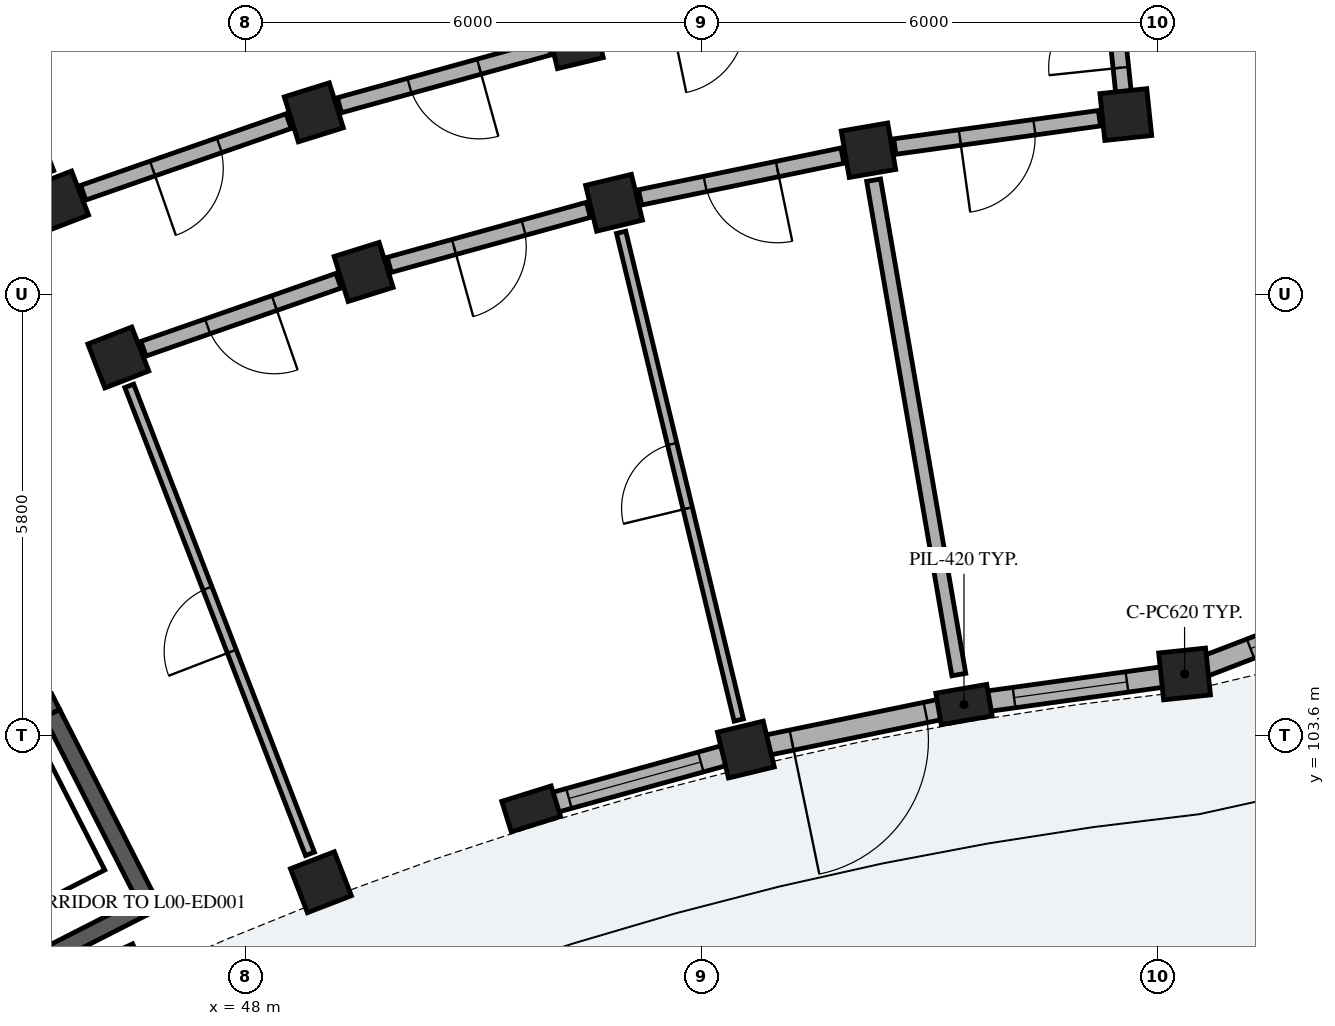
"""IFC4 building model, lengths in metres.
Left out: names, types, materials, properties, quantities, classifications, styles, units other than length and angle.
Written with IfcOpenShell. Run it as: python <this file> out.ifc"""

import sys

from ifc_helpers import new_model, si_unit, direction, frame, frame_2d, origin, origin_2d, place, context, subcontext, project, spatial, rectangle, extrude, element, fill, save


model = new_model("IFC4")
c1 = context("Model", 3, precision=1e-05, world=origin(), true_north=direction((0.0, 1.0)))
c2 = subcontext(c1, "Body", "Model", "MODEL_VIEW")
j1 = project(units=[si_unit("LENGTHUNIT", "METRE"), si_unit("PLANEANGLEUNIT", "RADIAN")], contexts=[c1])
p1 = place(None, origin())
s1 = spatial("IfcSite", under=j1, at=p1, CompositionType="ELEMENT")
p2 = place(p1, origin())
s2 = spatial("IfcBuilding", under=s1, at=p2, CompositionType="ELEMENT")
p3 = place(p2, origin())
s3 = spatial("IfcBuildingStorey", under=s2, at=p3, CompositionType="ELEMENT", Elevation=0.0)
p4 = place(p3, frame((42.597, 102.561, 0.0), z_axis=(0.0, 0.0, 1.0), x_axis=(0.891001200497, 0.454000947921, 0.0)))
e1 = element("IfcWall", 1, at=p4, inside=s3, PredefinedType="SHEAR", context=c2, shape_type="SweptSolid", body=[
    extrude(rectangle(XDim=3.26, YDim=0.23, at=frame_2d((1.63, 0.0))), origin(), (0.0, 0.0, 1.0), 4.48),
])
p5 = place(p4, frame((0.9, 0.0, 0.0)))
e2 = element("IfcOpeningElement", 2, at=p5, cuts=e1, PredefinedType="OPENING", context=c2, shape_type="SweptSolid", body=[
    extrude(rectangle(XDim=1.1, YDim=2.15, at=frame_2d((0.55, 1.075))), frame((0.0, 0.125, 0.0), z_axis=(0.0, -1.0, 0.0), x_axis=(1.0, 0.0, 0.0)), (0.0, 0.0, 1.0), 0.25),
])
p6 = place(p3, frame((43.927, 99.95, 0.0), z_axis=(0.0, 0.0, 1.0), x_axis=(0.891016635648, 0.453970654337, 0.0)))
e3 = element("IfcWall", 3, at=p6, inside=s3, PredefinedType="SHEAR", context=c2, shape_type="SweptSolid", body=[
    extrude(rectangle(XDim=3.26, YDim=0.23, at=frame_2d((1.63, 0.0))), origin(), (0.0, 0.0, 1.0), 4.48),
])
p7 = place(p3, frame((45.451, 103.886, 0.0), z_axis=(0.0, 0.0, 1.0), x_axis=(0.454000278178, -0.891001541758, 0.0)))
e4 = element("IfcWall", 4, at=p7, inside=s3, PredefinedType="SHEAR", context=c2, shape_type="SweptSolid", body=[
    extrude(rectangle(XDim=2.7, YDim=0.23, at=frame_2d((1.35, 0.0))), origin(), (0.0, 0.0, 1.0), 4.48),
])
for number, where, z_axis, x_axis in (
    (5, (60.354, 104.406, 0.0), (0.0, 0.0, 1.0), (-0.105, 0.995, 0.0)),
    (6, (59.58, 111.766, 0.0), (0.0, 0.0, 1.0), (-0.105, 0.995, 0.0)),
):
    element("IfcColumn", number, at=place(p3, frame(where, z_axis=z_axis, x_axis=x_axis)), inside=s3, PredefinedType="COLUMN", context=c2, shape_type="SweptSolid", body=[
        extrude(rectangle(XDim=0.62, YDim=0.62, at=origin_2d()), origin(), (0.0, 0.0, 1.0), 4.485),
    ])
p8 = place(p3, frame((57.451, 104.004, 0.0), z_axis=(0.0, 0.0, 1.0), x_axis=(-0.169827298811, 0.985473839622, 0.0)))
e7 = element("IfcColumn", 7, at=p8, inside=s3, PredefinedType="PILASTER", context=c2, shape_type="SweptSolid", body=[
    extrude(rectangle(XDim=0.42, YDim=0.68, at=origin_2d()), origin(), (0.0, 0.0, 1.0), 4.485),
])
for number, where, z_axis, x_axis in (
    (8, (56.194, 111.297, 0.0), (0.0, 0.0, 1.0), (-0.17, 0.985, 0.0)),
    (9, (54.582, 103.412, 0.0), (0.0, 0.0, 1.0), (-0.234, 0.972, 0.0)),
    (10, (52.847, 110.606, 0.0), (0.0, 0.0, 1.0), (-0.234, 0.972, 0.0)),
    (11, (52.331, 112.744, 0.0), (0.0, 0.0, 1.0), (-0.234, 0.972, 0.0)),
):
    element("IfcColumn", number, at=place(p3, frame(where, z_axis=z_axis, x_axis=x_axis)), inside=s3, PredefinedType="COLUMN", context=c2, shape_type="SweptSolid", body=[
        extrude(rectangle(XDim=0.62, YDim=0.62, at=origin_2d()), origin(), (0.0, 0.0, 1.0), 4.485),
    ])
p9 = place(p3, frame((51.757, 102.631, 0.0), z_axis=(0.0, 0.0, 1.0), x_axis=(-0.297930292146, 0.954587628781, 0.0)))
e12 = element("IfcColumn", 12, at=p9, inside=s3, PredefinedType="PILASTER", context=c2, shape_type="SweptSolid", body=[
    extrude(rectangle(XDim=0.42, YDim=0.68, at=origin_2d()), origin(), (0.0, 0.0, 1.0), 4.485),
])
for number, where, z_axis, x_axis in (
    (13, (49.552, 109.695, 0.0), (0.0, 0.0, 1.0), (-0.298, 0.955, 0.0)),
    (14, (48.897, 111.795, 0.0), (0.0, 0.0, 1.0), (-0.298, 0.955, 0.0)),
    (15, (48.99, 101.667, 0.0), (0.0, 0.0, 1.0), (-0.36, 0.933, 0.0)),
    (16, (46.325, 108.57, 0.0), (0.0, 0.0, 1.0), (-0.36, 0.933, 0.0)),
    (17, (45.532, 110.622, 0.0), (0.0, 0.0, 1.0), (-0.36, 0.933, 0.0)),
):
    element("IfcColumn", number, at=place(p3, frame(where, z_axis=z_axis, x_axis=x_axis)), inside=s3, PredefinedType="COLUMN", context=c2, shape_type="SweptSolid", body=[
        extrude(rectangle(XDim=0.62, YDim=0.62, at=origin_2d()), origin(), (0.0, 0.0, 1.0), 4.485),
    ])
p10 = place(p3, frame((46.293, 100.522, 0.0), z_axis=(0.0, 0.0, 1.0), x_axis=(-0.420859924104, 0.907125638643, 0.0)))
e18 = element("IfcColumn", 18, at=p10, inside=s3, PredefinedType="PILASTER", context=c2, shape_type="SweptSolid", body=[
    extrude(rectangle(XDim=0.42, YDim=0.68, at=origin_2d()), origin(), (0.0, 0.0, 1.0), 4.485),
])
p11 = place(p3, frame((60.076, 104.368, 0.0), z_axis=(0.0, 0.0, 1.0), x_axis=(-0.990533748482, -0.137269418003, 0.0)))
e19 = element("IfcWall", 19, at=p11, inside=s3, PredefinedType="SOLIDWALL", context=c2, shape_type="SweptSolid", body=[
    extrude(rectangle(XDim=2.47, YDim=0.27, at=frame_2d((1.235, 0.0))), origin(), (0.0, 0.0, 1.0), 3.755),
])
p12 = place(p11, frame((0.485, 0.0, 0.55)))
e20 = element("IfcOpeningElement", 20, at=p12, cuts=e19, PredefinedType="OPENING", context=c2, shape_type="SweptSolid", body=[
    extrude(rectangle(XDim=1.5, YDim=1.7, at=frame_2d((0.75, 0.85))), frame((0.0, 0.145, 0.0), z_axis=(0.0, -1.0, 0.0), x_axis=(1.0, 0.0, 0.0)), (0.0, 0.0, 1.0), 0.29),
])
p13 = place(p3, frame((57.275, 103.968, 0.0), z_axis=(0.0, 0.0, 1.0), x_axis=(-0.9793219046, -0.202308198478, 0.0)))
e21 = element("IfcWall", 21, at=p13, inside=s3, PredefinedType="SOLIDWALL", context=c2, shape_type="SweptSolid", body=[
    extrude(rectangle(XDim=2.47, YDim=0.27, at=frame_2d((1.235, 0.0))), origin(), (0.0, 0.0, 1.0), 3.755),
])
p14 = place(p13, frame((0.335, 0.0, 0.0)))
e22 = element("IfcOpeningElement", 22, at=p14, cuts=e21, PredefinedType="OPENING", context=c2, shape_type="SweptSolid", body=[
    extrude(rectangle(XDim=1.8, YDim=2.15, at=frame_2d((0.9, 1.075))), frame((0.0, 0.145, 0.0), z_axis=(0.0, -1.0, 0.0), x_axis=(1.0, 0.0, 0.0)), (0.0, 0.0, 1.0), 0.29),
])
p15 = place(p3, frame((54.312, 103.337, 0.0), z_axis=(0.0, 0.0, 1.0), x_axis=(-0.963903451939, -0.266252014716, 0.0)))
e23 = element("IfcWall", 23, at=p15, inside=s3, PredefinedType="SOLIDWALL", context=c2, shape_type="SweptSolid", body=[
    extrude(rectangle(XDim=2.47, YDim=0.27, at=frame_2d((1.235, 0.0))), origin(), (0.0, 0.0, 1.0), 3.755),
])
p16 = place(p15, frame((0.335, 0.0, 0.55)))
e24 = element("IfcOpeningElement", 24, at=p16, cuts=e23, PredefinedType="OPENING", context=c2, shape_type="SweptSolid", body=[
    extrude(rectangle(XDim=1.8, YDim=1.85, at=frame_2d((0.9, 0.925))), frame((0.0, 0.145, 0.0), z_axis=(0.0, -1.0, 0.0), x_axis=(1.0, 0.0, 0.0)), (0.0, 0.0, 1.0), 0.29),
])
p17 = place(p3, frame((64.002, 105.807, 0.0), z_axis=(0.0, 0.0, 1.0), x_axis=(-0.93356922619, -0.35839712598, 0.0)))
e25 = element("IfcWall", 25, at=p17, inside=s3, PredefinedType="SOLIDWALL", context=c2, shape_type="SweptSolid", body=[
    extrude(rectangle(XDim=3.908, YDim=0.27, at=frame_2d((1.954, 0.0))), origin(), (0.0, 0.0, 1.0), 3.755),
])
p18 = place(p17, frame((0.929, 0.0, 0.4)))
e26 = element("IfcOpeningElement", 26, at=p18, cuts=e25, PredefinedType="OPENING", context=c2, shape_type="SweptSolid", body=[
    extrude(rectangle(XDim=2.05, YDim=1.82, at=frame_2d((1.025, 0.91))), frame((0.0, 0.145, 0.0), z_axis=(0.0, -1.0, 0.0), x_axis=(1.0, 0.0, 0.0)), (0.0, 0.0, 1.0), 0.29),
])
p19 = place(p3, frame((59.233, 111.718, 0.0), z_axis=(0.0, 0.0, 1.0), x_axis=(-0.990535404475, -0.137257467855, 0.0)))
e27 = element("IfcWall", 27, at=p19, inside=s3, PredefinedType="PARTITIONING", context=c2, shape_type="SweptSolid", body=[
    extrude(rectangle(XDim=2.718, YDim=0.205, at=frame_2d((1.359, 0.0))), origin(), (0.0, 0.0, 1.0), 3.1),
])
p20 = place(p19, frame((0.864, 0.0, 0.0)))
e28 = element("IfcOpeningElement", 28, at=p20, cuts=e27, PredefinedType="OPENING", context=c2, shape_type="SweptSolid", body=[
    extrude(rectangle(XDim=0.99, YDim=2.16, at=frame_2d((0.495, 1.08))), frame((0.0, 0.113, 0.0), z_axis=(0.0, -1.0, 0.0), x_axis=(1.0, 0.0, 0.0)), (0.0, 0.0, 1.0), 0.225),
])
p21 = place(p3, frame((57.383, 104.398, 0.0), z_axis=(0.0, 0.0, 1.0), x_axis=(-0.169825160084, 0.985474208187, 0.0)))
e29 = element("IfcWall", 29, at=p21, inside=s3, PredefinedType="PARTITIONING", context=c2, shape_type="SweptSolid", body=[
    extrude(rectangle(XDim=6.6, YDim=0.185, at=frame_2d((3.3, 0.0))), origin(), (0.0, 0.0, 1.0), 3.1),
])
p22 = place(p3, frame((55.852, 111.226, 0.0), z_axis=(0.0, 0.0, 1.0), x_axis=(-0.979349423541, -0.202174940608, 0.0)))
e30 = element("IfcWall", 30, at=p22, inside=s3, PredefinedType="PARTITIONING", context=c2, shape_type="SweptSolid", body=[
    extrude(rectangle(XDim=2.718, YDim=0.205, at=frame_2d((1.359, 0.0))), origin(), (0.0, 0.0, 1.0), 3.1),
])
p23 = place(p22, frame((0.874, 0.0, 0.0)))
e31 = element("IfcOpeningElement", 31, at=p23, cuts=e30, PredefinedType="OPENING", context=c2, shape_type="SweptSolid", body=[
    extrude(rectangle(XDim=0.97, YDim=2.15, at=frame_2d((0.485, 1.075))), frame((0.0, 0.113, 0.0), z_axis=(0.0, -1.0, 0.0), x_axis=(1.0, 0.0, 0.0)), (0.0, 0.0, 1.0), 0.225),
])
p24 = place(p3, frame((54.488, 103.801, 0.0), z_axis=(0.0, 0.0, 1.0), x_axis=(-0.234406698576, 0.972138621629, 0.0)))
e32 = element("IfcWall", 32, at=p24, inside=s3, PredefinedType="PARTITIONING", context=c2, shape_type="SweptSolid", body=[
    extrude(rectangle(XDim=6.6, YDim=0.125, at=frame_2d((3.3, 0.0))), origin(), (0.0, 0.0, 1.0), 3.1),
])
p25 = place(p24, frame((2.865, 0.0, 0.0)))
e33 = element("IfcOpeningElement", 33, at=p25, cuts=e32, PredefinedType="OPENING", context=c2, shape_type="SweptSolid", body=[
    extrude(rectangle(XDim=0.87, YDim=2.08, at=frame_2d((0.435, 1.04))), frame((0.0, 0.073, 0.0), z_axis=(0.0, -1.0, 0.0), x_axis=(1.0, 0.0, 0.0)), (0.0, 0.0, 1.0), 0.145),
])
p26 = place(p3, frame((51.994, 112.651, 0.0), z_axis=(0.0, 0.0, 1.0), x_axis=(-0.963890789093, -0.266297853356, 0.0)))
e34 = element("IfcWall", 34, at=p26, inside=s3, PredefinedType="PARTITIONING", context=c2, shape_type="SweptSolid", body=[
    extrude(rectangle(XDim=2.863, YDim=0.205, at=frame_2d((1.432, 0.0))), origin(), (0.0, 0.0, 1.0), 3.1),
])
p27 = place(p26, frame((0.957, 0.0, 0.0)))
e35 = element("IfcOpeningElement", 35, at=p27, cuts=e34, PredefinedType="OPENING", context=c2, shape_type="SweptSolid", body=[
    extrude(rectangle(XDim=0.95, YDim=2.13, at=frame_2d((0.475, 1.065))), frame((0.0, 0.113, 0.0), z_axis=(0.0, -1.0, 0.0), x_axis=(1.0, 0.0, 0.0)), (0.0, 0.0, 1.0), 0.225),
])
p28 = place(p3, frame((52.51, 110.512, 0.0), z_axis=(0.0, 0.0, 1.0), x_axis=(-0.96388375821, -0.266323301006, 0.0)))
e36 = element("IfcWall", 36, at=p28, inside=s3, PredefinedType="PARTITIONING", context=c2, shape_type="SweptSolid", body=[
    extrude(rectangle(XDim=2.718, YDim=0.205, at=frame_2d((1.359, 0.0))), origin(), (0.0, 0.0, 1.0), 3.1),
])
p29 = place(p28, frame((0.884, 0.0, 0.0)))
e37 = element("IfcOpeningElement", 37, at=p29, cuts=e36, PredefinedType="OPENING", context=c2, shape_type="SweptSolid", body=[
    extrude(rectangle(XDim=0.95, YDim=2.13, at=frame_2d((0.475, 1.065))), frame((0.0, 0.113, 0.0), z_axis=(0.0, -1.0, 0.0), x_axis=(1.0, 0.0, 0.0)), (0.0, 0.0, 1.0), 0.225),
])
p30 = place(p3, frame((48.566, 111.68, 0.0), z_axis=(0.0, 0.0, 1.0), x_axis=(-0.944253820929, -0.329218349522, 0.0)))
e38 = element("IfcWall", 38, at=p30, inside=s3, PredefinedType="PARTITIONING", context=c2, shape_type="SweptSolid", body=[
    extrude(rectangle(XDim=2.863, YDim=0.205, at=frame_2d((1.432, 0.0))), origin(), (0.0, 0.0, 1.0), 3.1),
])
p31 = place(p30, frame((0.967, 0.0, 0.0)))
e39 = element("IfcOpeningElement", 39, at=p31, cuts=e38, PredefinedType="OPENING", context=c2, shape_type="SweptSolid", body=[
    extrude(rectangle(XDim=0.93, YDim=2.12, at=frame_2d((0.465, 1.06))), frame((0.0, 0.113, 0.0), z_axis=(0.0, -1.0, 0.0), x_axis=(1.0, 0.0, 0.0)), (0.0, 0.0, 1.0), 0.225),
])
p32 = place(p3, frame((49.222, 109.58, 0.0), z_axis=(0.0, 0.0, 1.0), x_axis=(-0.944265123647, -0.329185929627, 0.0)))
e40 = element("IfcWall", 40, at=p32, inside=s3, PredefinedType="PARTITIONING", context=c2, shape_type="SweptSolid", body=[
    extrude(rectangle(XDim=2.718, YDim=0.205, at=frame_2d((1.359, 0.0))), origin(), (0.0, 0.0, 1.0), 3.1),
])
p33 = place(p32, frame((0.894, 0.0, 0.0)))
e41 = element("IfcOpeningElement", 41, at=p33, cuts=e40, PredefinedType="OPENING", context=c2, shape_type="SweptSolid", body=[
    extrude(rectangle(XDim=0.93, YDim=2.12, at=frame_2d((0.465, 1.06))), frame((0.0, 0.113, 0.0), z_axis=(0.0, -1.0, 0.0), x_axis=(1.0, 0.0, 0.0)), (0.0, 0.0, 1.0), 0.225),
])
p34 = place(p3, frame((45.388, 110.996, 0.0), z_axis=(0.0, 0.0, 1.0), x_axis=(-0.360186633854, 0.932880264982, 0.0)))
e42 = element("IfcWall", 42, at=p34, inside=s3, PredefinedType="PARTITIONING", context=c2, shape_type="SweptSolid", body=[
    extrude(rectangle(XDim=4.7, YDim=0.185, at=frame_2d((2.35, 0.0))), origin(), (0.0, 0.0, 1.0), 3.1),
])
p35 = place(p3, frame((48.846, 102.04, 0.0), z_axis=(0.0, 0.0, 1.0), x_axis=(-0.360183473608, 0.932881485152, 0.0)))
e43 = element("IfcWall", 43, at=p35, inside=s3, PredefinedType="PARTITIONING", context=c2, shape_type="SweptSolid", body=[
    extrude(rectangle(XDim=6.6, YDim=0.125, at=frame_2d((3.3, 0.0))), origin(), (0.0, 0.0, 1.0), 3.1),
])
p36 = place(p35, frame((2.855, 0.0, 0.0)))
e44 = element("IfcOpeningElement", 44, at=p36, cuts=e43, PredefinedType="OPENING", context=c2, shape_type="SweptSolid", body=[
    extrude(rectangle(XDim=0.89, YDim=2.1, at=frame_2d((0.445, 1.05))), frame((0.0, 0.073, 0.0), z_axis=(0.0, -1.0, 0.0), x_axis=(1.0, 0.0, 0.0)), (0.0, 0.0, 1.0), 0.145),
])
p37 = place(p3, frame((59.575, 111.816, 0.0), z_axis=(0.0, 0.0, 1.0), x_axis=(-0.104509292252, 0.994523910136, 0.0)))
e45 = element("IfcWall", 45, at=p37, inside=s3, PredefinedType="PARTITIONING", context=c2, shape_type="SweptSolid", body=[
    extrude(rectangle(XDim=2.1, YDim=0.205, at=frame_2d((1.05, 0.0))), origin(), (0.0, 0.0, 1.0), 3.1),
])
p38 = place(p37, frame((0.57, 0.0, 0.0)))
e46 = element("IfcOpeningElement", 46, at=p38, cuts=e45, PredefinedType="OPENING", context=c2, shape_type="SweptSolid", body=[
    extrude(rectangle(XDim=0.95, YDim=2.13, at=frame_2d((0.475, 1.065))), frame((0.0, 0.113, 0.0), z_axis=(0.0, -1.0, 0.0), x_axis=(1.0, 0.0, 0.0)), (0.0, 0.0, 1.0), 0.225),
])
p39 = place(p12, origin())
e47 = element("IfcWindow", 47, at=p39, inside=s3, PartitioningType="SINGLE_PANEL", PredefinedType="WINDOW", context=c2, shape_type="SweptSolid", body=[
    extrude(rectangle(XDim=1.5, YDim=1.7, at=frame_2d((0.75, 0.85))), frame((0.0, 0.03, 0.0), z_axis=(0.0, -1.0, 0.0), x_axis=(1.0, 0.0, 0.0)), (0.0, 0.0, 1.0), 0.06),
])
fill(e20, e47)
p40 = place(p14, origin())
e48 = element("IfcDoor", 48, at=p40, inside=s3, OperationType="DOUBLE_DOOR_SINGLE_SWING", PredefinedType="DOOR", context=c2, shape_type="SweptSolid", body=[
    extrude(rectangle(XDim=1.8, YDim=2.15, at=frame_2d((0.9, 1.075))), frame((0.0, 0.025, 0.0), z_axis=(0.0, -1.0, 0.0), x_axis=(1.0, 0.0, 0.0)), (0.0, 0.0, 1.0), 0.05),
])
fill(e22, e48)
p41 = place(p16, origin())
e49 = element("IfcWindow", 49, at=p41, inside=s3, PartitioningType="SINGLE_PANEL", PredefinedType="WINDOW", context=c2, shape_type="SweptSolid", body=[
    extrude(rectangle(XDim=1.8, YDim=1.85, at=frame_2d((0.9, 0.925))), frame((0.0, 0.03, 0.0), z_axis=(0.0, -1.0, 0.0), x_axis=(1.0, 0.0, 0.0)), (0.0, 0.0, 1.0), 0.06),
])
fill(e24, e49)
p42 = place(p18, origin())
e50 = element("IfcWindow", 50, at=p42, inside=s3, PartitioningType="SINGLE_PANEL", PredefinedType="WINDOW", context=c2, shape_type="SweptSolid", body=[
    extrude(rectangle(XDim=2.05, YDim=1.82, at=frame_2d((1.025, 0.91))), frame((0.0, 0.03, 0.0), z_axis=(0.0, -1.0, 0.0), x_axis=(1.0, 0.0, 0.0)), (0.0, 0.0, 1.0), 0.06),
])
fill(e26, e50)
p43 = place(p20, origin())
e51 = element("IfcDoor", 51, at=p43, inside=s3, OperationType="SINGLE_SWING_RIGHT", PredefinedType="DOOR", context=c2, shape_type="SweptSolid", body=[
    extrude(rectangle(XDim=0.99, YDim=2.16, at=frame_2d((0.495, 1.08))), frame((0.0, 0.025, 0.0), z_axis=(0.0, -1.0, 0.0), x_axis=(1.0, 0.0, 0.0)), (0.0, 0.0, 1.0), 0.05),
])
fill(e28, e51)
p44 = place(p23, origin())
e52 = element("IfcDoor", 52, at=p44, inside=s3, OperationType="SINGLE_SWING_LEFT", PredefinedType="DOOR", context=c2, shape_type="SweptSolid", body=[
    extrude(rectangle(XDim=0.97, YDim=2.15, at=frame_2d((0.485, 1.075))), frame((0.0, 0.025, 0.0), z_axis=(0.0, -1.0, 0.0), x_axis=(1.0, 0.0, 0.0)), (0.0, 0.0, 1.0), 0.05),
])
fill(e31, e52)
p45 = place(p25, origin())
e53 = element("IfcDoor", 53, at=p45, inside=s3, OperationType="SINGLE_SWING_LEFT", PredefinedType="DOOR", context=c2, shape_type="SweptSolid", body=[
    extrude(rectangle(XDim=0.87, YDim=2.08, at=frame_2d((0.435, 1.04))), frame((0.0, 0.025, 0.0), z_axis=(0.0, -1.0, 0.0), x_axis=(1.0, 0.0, 0.0)), (0.0, 0.0, 1.0), 0.05),
])
fill(e33, e53)
p46 = place(p27, origin())
e54 = element("IfcDoor", 54, at=p46, inside=s3, OperationType="SINGLE_SWING_LEFT", PredefinedType="DOOR", context=c2, shape_type="SweptSolid", body=[
    extrude(rectangle(XDim=0.95, YDim=2.13, at=frame_2d((0.475, 1.065))), frame((0.0, 0.025, 0.0), z_axis=(0.0, -1.0, 0.0), x_axis=(1.0, 0.0, 0.0)), (0.0, 0.0, 1.0), 0.05),
])
fill(e35, e54)
p47 = place(p29, origin())
e55 = element("IfcDoor", 55, at=p47, inside=s3, OperationType="SINGLE_SWING_RIGHT", PredefinedType="DOOR", context=c2, shape_type="SweptSolid", body=[
    extrude(rectangle(XDim=0.95, YDim=2.13, at=frame_2d((0.475, 1.065))), frame((0.0, 0.025, 0.0), z_axis=(0.0, -1.0, 0.0), x_axis=(1.0, 0.0, 0.0)), (0.0, 0.0, 1.0), 0.05),
])
fill(e37, e55)
p48 = place(p31, origin())
e56 = element("IfcDoor", 56, at=p48, inside=s3, OperationType="SINGLE_SWING_RIGHT", PredefinedType="DOOR", context=c2, shape_type="SweptSolid", body=[
    extrude(rectangle(XDim=0.93, YDim=2.12, at=frame_2d((0.465, 1.06))), frame((0.0, 0.025, 0.0), z_axis=(0.0, -1.0, 0.0), x_axis=(1.0, 0.0, 0.0)), (0.0, 0.0, 1.0), 0.05),
])
fill(e39, e56)
p49 = place(p33, origin())
e57 = element("IfcDoor", 57, at=p49, inside=s3, OperationType="SINGLE_SWING_LEFT", PredefinedType="DOOR", context=c2, shape_type="SweptSolid", body=[
    extrude(rectangle(XDim=0.93, YDim=2.12, at=frame_2d((0.465, 1.06))), frame((0.0, 0.025, 0.0), z_axis=(0.0, -1.0, 0.0), x_axis=(1.0, 0.0, 0.0)), (0.0, 0.0, 1.0), 0.05),
])
fill(e41, e57)
p50 = place(p36, origin())
e58 = element("IfcDoor", 58, at=p50, inside=s3, OperationType="SINGLE_SWING_LEFT", PredefinedType="DOOR", context=c2, shape_type="SweptSolid", body=[
    extrude(rectangle(XDim=0.89, YDim=2.1, at=frame_2d((0.445, 1.05))), frame((0.0, 0.025, 0.0), z_axis=(0.0, -1.0, 0.0), x_axis=(1.0, 0.0, 0.0)), (0.0, 0.0, 1.0), 0.05),
])
fill(e44, e58)
p51 = place(p38, origin())
e59 = element("IfcDoor", 59, at=p51, inside=s3, OperationType="SINGLE_SWING_LEFT", PredefinedType="DOOR", context=c2, shape_type="SweptSolid", body=[
    extrude(rectangle(XDim=0.95, YDim=2.13, at=frame_2d((0.475, 1.065))), frame((0.0, 0.025, 0.0), z_axis=(0.0, -1.0, 0.0), x_axis=(1.0, 0.0, 0.0)), (0.0, 0.0, 1.0), 0.05),
])
fill(e46, e59)
save(model, sys.argv[1])
